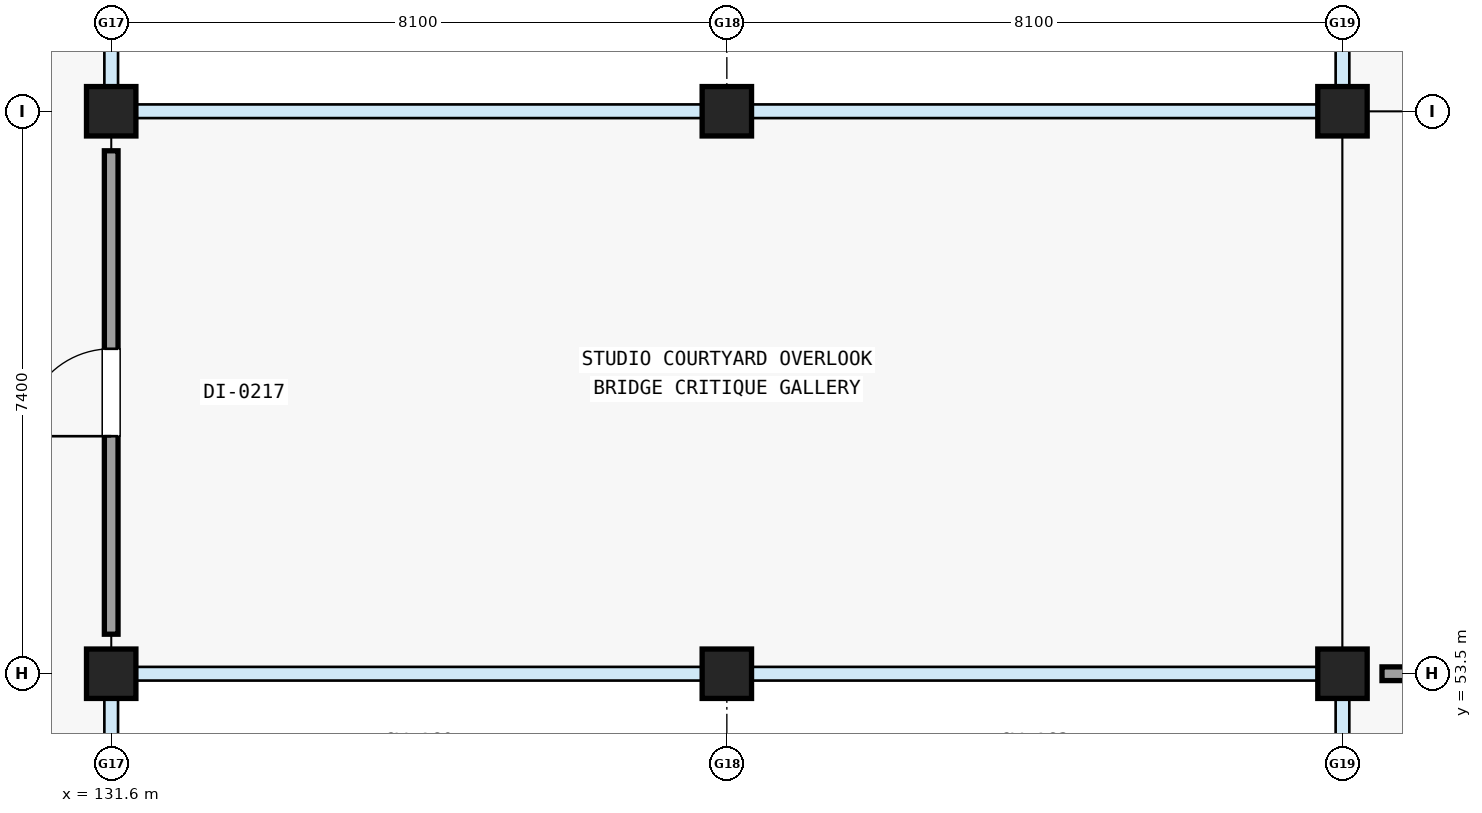
"""IFC4 building model, lengths in metres.
Left out: names, types, materials, properties, quantities, classifications, styles, units other than length and angle.
Written with IfcOpenShell. Run it as: python <this file> out.ifc"""

import sys

from ifc_helpers import new_model, si_unit, direction, frame, frame_2d, origin, origin_2d, place, context, subcontext, project, spatial, rectangle, extrude, element, fill, save


model = new_model("IFC4")
c1 = context("Model", 3, precision=1e-05, world=origin(), true_north=direction((0.0, 1.0)))
c2 = subcontext(c1, "Body", "Model", "MODEL_VIEW")
j1 = project(units=[si_unit("LENGTHUNIT", "METRE"), si_unit("PLANEANGLEUNIT", "RADIAN")], contexts=[c1])
p1 = place(None, origin())
s1 = spatial("IfcSite", under=j1, at=p1, CompositionType="ELEMENT")
p2 = place(p1, origin())
s2 = spatial("IfcBuilding", under=s1, at=p2, CompositionType="ELEMENT")
p3 = place(p2, frame((0.0, 0.0, 5.4)))
s3 = spatial("IfcBuildingStorey", under=s2, at=p3, CompositionType="ELEMENT", Elevation=5.4)
for number, where, z_axis, x_axis in (
    (1, (131.6, 53.5, 0.0), (0.0, 0.0, 1.0), (1.0, 0.0, 0.0)),
    (2, (131.6, 60.9, 0.0), (0.0, 0.0, 1.0), (1.0, 0.0, 0.0)),
    (3, (139.7, 53.5, 0.0), (0.0, 0.0, 1.0), (1.0, 0.0, 0.0)),
    (4, (139.7, 60.9, 0.0), (0.0, 0.0, 1.0), (1.0, 0.0, 0.0)),
    (5, (147.8, 53.5, 0.0), (0.0, 0.0, 1.0), (1.0, 0.0, 0.0)),
    (6, (147.8, 60.9, 0.0), (0.0, 0.0, 1.0), (1.0, 0.0, 0.0)),
):
    element("IfcColumn", number, at=place(p3, frame(where, z_axis=z_axis, x_axis=x_axis)), inside=s3, PredefinedType="COLUMN", context=c2, shape_type="SweptSolid", body=[
        extrude(rectangle(XDim=0.65, YDim=0.65, at=origin_2d()), origin(), (0.0, 0.0, 1.0), 4.56),
    ])
p4 = place(p3, frame((131.6, 54.02, 0.0), z_axis=(0.0, 0.0, 1.0), x_axis=(0.0, 1.0, 0.0)))
e7 = element("IfcWall", 7, at=p4, inside=s3, PredefinedType="PARTITIONING", context=c2, shape_type="SweptSolid", body=[
    extrude(rectangle(XDim=6.36, YDim=0.18, at=frame_2d((3.18, 0.0))), origin(), (0.0, 0.0, 1.0), 3.85),
])
p5 = place(p4, frame((2.605, 0.0, 0.0)))
e8 = element("IfcOpeningElement", 8, at=p5, cuts=e7, PredefinedType="OPENING", context=c2, shape_type="SweptSolid", body=[
    extrude(rectangle(XDim=1.15, YDim=2.15, at=frame_2d((0.575, 1.075))), frame((0.0, 0.1, 0.0), z_axis=(0.0, -1.0, 0.0), x_axis=(1.0, 0.0, 0.0)), (0.0, 0.0, 1.0), 0.2),
])
p6 = place(p3, frame((148.32, 53.5, 0.0), z_axis=(0.0, 0.0, 1.0), x_axis=(1.0, 0.0, 0.0)))
e9 = element("IfcWall", 9, at=p6, inside=s3, PredefinedType="PARTITIONING", context=c2, shape_type="SweptSolid", body=[
    extrude(rectangle(XDim=7.06, YDim=0.18, at=frame_2d((3.53, 0.0))), origin(), (0.0, 0.0, 1.0), 3.85),
])
p7 = place(p6, frame((2.955, 0.0, 0.0)))
e10 = element("IfcOpeningElement", 10, at=p7, cuts=e9, PredefinedType="OPENING", context=c2, shape_type="SweptSolid", body=[
    extrude(rectangle(XDim=1.15, YDim=2.15, at=frame_2d((0.575, 1.075))), frame((0.0, 0.1, 0.0), z_axis=(0.0, -1.0, 0.0), x_axis=(1.0, 0.0, 0.0)), (0.0, 0.0, 1.0), 0.2),
])
p8 = place(p5, origin())
e11 = element("IfcDoor", 11, at=p8, inside=s3, OperationType="SINGLE_SWING_LEFT", PredefinedType="DOOR", context=c2, shape_type="SweptSolid", body=[
    extrude(rectangle(XDim=1.15, YDim=2.15, at=frame_2d((0.575, 1.075))), frame((0.0, 0.025, 0.0), z_axis=(0.0, -1.0, 0.0), x_axis=(1.0, 0.0, 0.0)), (0.0, 0.0, 1.0), 0.05),
])
fill(e8, e11)
save(model, sys.argv[1])
